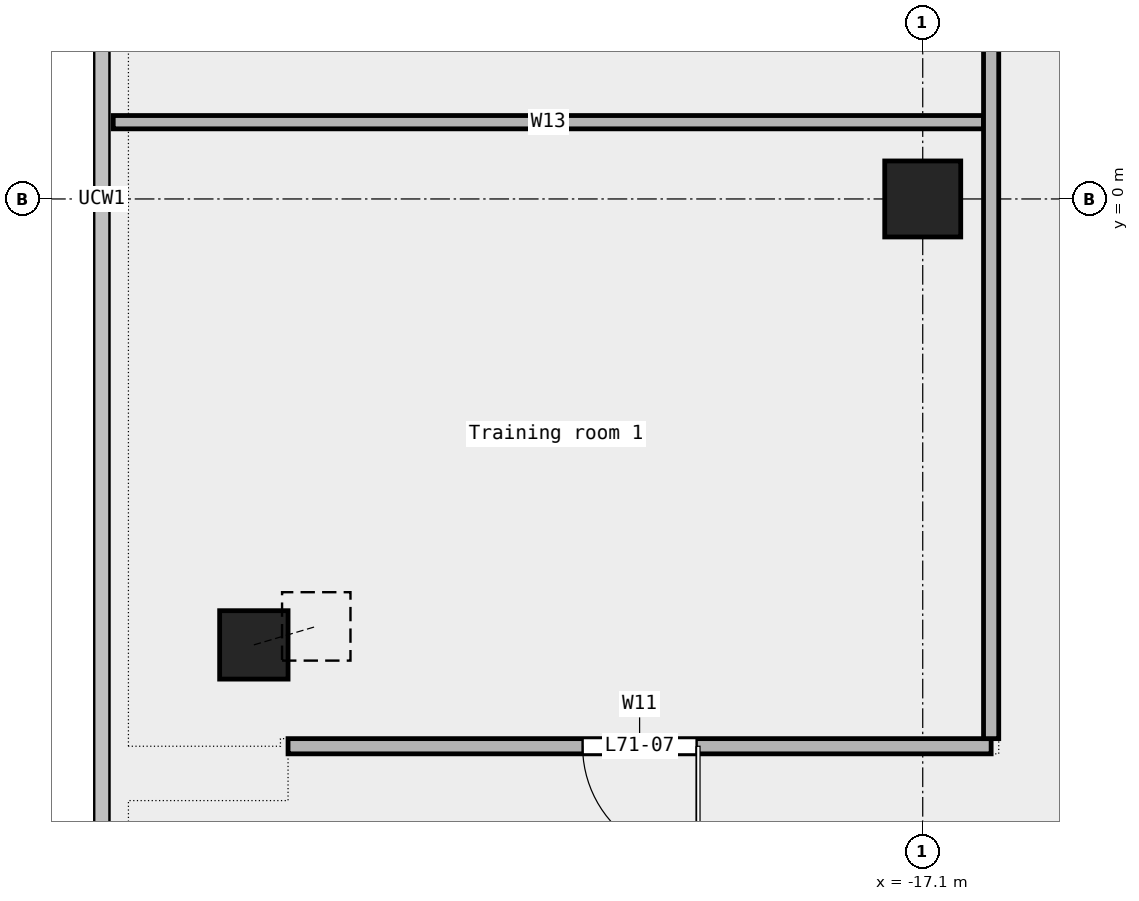
"""IFC4 building model, lengths in metres.
Left out: names, types, materials, properties, quantities, classifications, styles, units other than length and angle.
Written with IfcOpenShell. Run it as: python <this file> out.ifc"""

import sys

from ifc_helpers import new_model, si_unit, direction, frame, frame_2d, origin, origin_2d, place, context, subcontext, project, spatial, rectangle, extrude, element, fill, save


model = new_model("IFC4")
c1 = context("Model", 3, precision=1e-05, world=origin(), true_north=direction((0.0, 1.0)))
c2 = subcontext(c1, "Body", "Model", "MODEL_VIEW")
j1 = project(units=[si_unit("LENGTHUNIT", "METRE"), si_unit("PLANEANGLEUNIT", "RADIAN")], contexts=[c1])
p1 = place(None, origin())
s1 = spatial("IfcSite", under=j1, at=p1, CompositionType="ELEMENT")
p2 = place(p1, origin())
s2 = spatial("IfcBuilding", under=s1, at=p2, CompositionType="ELEMENT")
p3 = place(p2, frame((0.0, 0.0, 325.4)))
s3 = spatial("IfcBuildingStorey", under=s2, at=p3, CompositionType="ELEMENT", Elevation=325.4)
p4 = place(p3, frame((-25.9, -5.867, 0.0), z_axis=(0.218989598564, 0.064856865944, 0.973569279847), x_axis=(-0.283971837833, 0.958832621117, 0.0)))
e1 = element("IfcColumn", 1, at=p4, inside=s3, PredefinedType="COLUMN", context=c2, shape_type="SweptSolid", body=[
    extrude(rectangle(XDim=0.9, YDim=0.9, at=origin_2d()), origin(), (0.0, 0.0, 1.0), 3.749),
])
p5 = place(p3, frame((-17.1, 0.0, 0.0), z_axis=(0.0, 0.0, 1.0), x_axis=(1.0, 0.0, 0.0)))
e2 = element("IfcColumn", 2, at=p5, inside=s3, PredefinedType="COLUMN", context=c2, shape_type="SweptSolid", body=[
    extrude(rectangle(XDim=1.0, YDim=1.0, at=origin_2d()), origin(), (0.0, 0.0, 1.0), 3.65),
])
p6 = place(p3, frame((-25.45, -7.2, 0.0), z_axis=(0.0, 0.0, 1.0), x_axis=(1.0, 0.0, 0.0)))
e3 = element("IfcWall", 3, at=p6, inside=s3, PredefinedType="PARTITIONING", context=c2, shape_type="SweptSolid", body=[
    extrude(rectangle(XDim=9.25, YDim=0.2, at=frame_2d((4.625, 0.0))), origin(), (0.0, 0.0, 1.0), 3.65),
])
p7 = place(p6, frame((3.875, 0.0, 0.0)))
e4 = element("IfcOpeningElement", 4, at=p7, cuts=e3, PredefinedType="OPENING", context=c2, shape_type="SweptSolid", body=[
    extrude(rectangle(XDim=1.5, YDim=2.1, at=frame_2d((0.75, 1.05))), frame((0.0, 0.112, 0.0), z_axis=(0.0, -1.0, 0.0), x_axis=(1.0, 0.0, 0.0)), (0.0, 0.0, 1.0), 0.224),
])
p8 = place(p3, frame((-27.75, 1.01, 0.0), z_axis=(0.0, 0.0, 1.0), x_axis=(1.0, 0.0, 0.0)))
e5 = element("IfcWall", 5, at=p8, inside=s3, PredefinedType="PARTITIONING", context=c2, shape_type="SweptSolid", body=[
    extrude(rectangle(XDim=11.45, YDim=0.175, at=frame_2d((5.725, 0.0))), origin(), (0.0, 0.0, 1.0), 3.65),
])
p9 = place(p3, frame((-16.2, -7.1, 0.0), z_axis=(0.0, 0.0, 1.0), x_axis=(0.0, 1.0, 0.0)))
e6 = element("IfcWall", 6, at=p9, inside=s3, PredefinedType="PARTITIONING", context=c2, shape_type="SweptSolid", body=[
    extrude(rectangle(XDim=20.5, YDim=0.2, at=frame_2d((10.25, 0.0))), origin(), (0.0, 0.0, 1.0), 3.65),
])
p10 = place(p9, frame((10.4, 0.0, 0.0)))
e7 = element("IfcOpeningElement", 7, at=p10, cuts=e6, PredefinedType="OPENING", context=c2, shape_type="SweptSolid", body=[
    extrude(rectangle(XDim=1.2, YDim=2.1, at=frame_2d((0.6, 1.05))), frame((0.0, 0.112, 0.0), z_axis=(0.0, -1.0, 0.0), x_axis=(1.0, 0.0, 0.0)), (0.0, 0.0, 1.0), 0.224),
])
p11 = place(p7, origin())
e8 = element("IfcDoor", 8, at=p11, inside=s3, OperationType="DOUBLE_DOOR_SINGLE_SWING", PredefinedType="DOOR", context=c2, shape_type="SweptSolid", body=[
    extrude(rectangle(XDim=1.5, YDim=2.1, at=frame_2d((0.75, 1.05))), frame((0.0, 0.025, 0.0), z_axis=(0.0, -1.0, 0.0), x_axis=(1.0, 0.0, 0.0)), (0.0, 0.0, 1.0), 0.05),
])
fill(e4, e8)
save(model, sys.argv[1])
